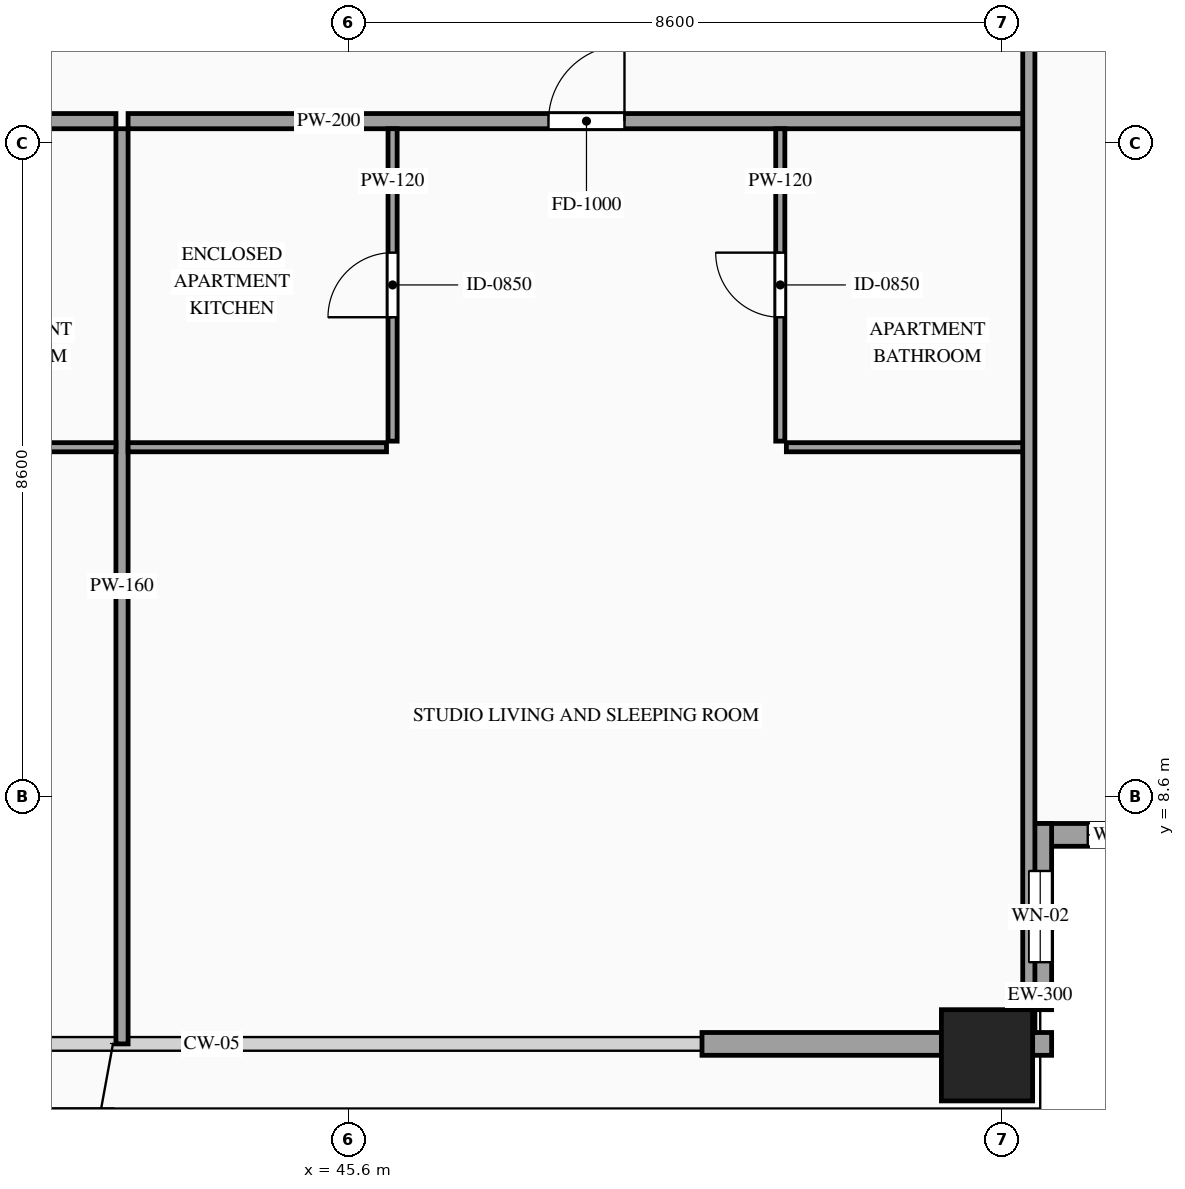
"""IFC4 building model, lengths in metres.
Left out: names, types, materials, properties, quantities, classifications, styles, units other than length and angle.
Written with IfcOpenShell. Run it as: python <this file> out.ifc"""

import sys

from ifc_helpers import new_model, si_unit, direction, frame, frame_2d, origin, origin_2d, place, context, subcontext, project, spatial, rectangle, hollow_rectangle, extrude, source, transform, mapped, element, fill, save


model = new_model("IFC4")
c1 = context("Model", 3, precision=1e-05, world=origin(), true_north=direction((0.0, 1.0)))
c2 = subcontext(c1, "Body", "Model", "MODEL_VIEW")
j1 = project(units=[si_unit("LENGTHUNIT", "METRE"), si_unit("PLANEANGLEUNIT", "RADIAN")], contexts=[c1])
p1 = place(None, origin())
s1 = spatial("IfcSite", under=j1, at=p1, CompositionType="ELEMENT")
p2 = place(p1, origin())
s2 = spatial("IfcBuilding", under=s1, at=p2, CompositionType="ELEMENT")
p3 = place(p2, frame((0.0, 0.0, 241.6)))
s3 = spatial("IfcBuildingStorey", under=s2, at=p3, CompositionType="ELEMENT", Elevation=241.6)
m1 = source(origin(), c2, "Body", "SweptSolid", [
    extrude(hollow_rectangle(XDim=1.2, YDim=1.2, WallThickness=0.055, at=origin_2d()), origin(), (0.0, 0.0, 1.0), 3.5),
])
p4 = place(p3, frame((54.0, 5.2, 0.0), z_axis=(0.0, 0.0, 1.0), x_axis=(1.0, 0.0, 0.0)))
e1 = element("IfcColumn", 1, at=p4, inside=s3, PredefinedType="COLUMN", context=c2, shape_type="MappedRepresentation", body=[
    mapped(m1, transform((0.0, 0.0, 0.0), scale=1.0)),
])
p5 = place(p3, frame((54.55, 8.1, 0.0), z_axis=(0.0, 0.0, 1.0), x_axis=(1.0, 0.0, 0.0)))
e2 = element("IfcWall", 2, at=p5, inside=s3, PredefinedType="SOLIDWALL", context=c2, shape_type="SweptSolid", body=[
    extrude(rectangle(XDim=2.45, YDim=0.3, at=frame_2d((1.225, 0.0))), origin(), (0.0, 0.0, 1.0), 3.28),
])
p6 = place(p5, frame((0.775, 0.0, 0.85)))
e3 = element("IfcOpeningElement", 3, at=p6, cuts=e2, PredefinedType="OPENING", context=c2, shape_type="SweptSolid", body=[
    extrude(rectangle(XDim=0.9, YDim=1.5, at=frame_2d((0.45, 0.75))), frame((0.0, 0.165, 0.0), z_axis=(0.0, -1.0, 0.0), x_axis=(1.0, 0.0, 0.0)), (0.0, 0.0, 1.0), 0.33),
])
p7 = place(p3, frame((54.7, 5.8, 0.0), z_axis=(0.0, 0.0, 1.0), x_axis=(0.0, 1.0, 0.0)))
e4 = element("IfcWall", 4, at=p7, inside=s3, PredefinedType="SOLIDWALL", context=c2, shape_type="SweptSolid", body=[
    extrude(rectangle(XDim=2.45, YDim=0.3, at=frame_2d((1.225, 0.0))), origin(), (0.0, 0.0, 1.0), 3.28),
])
p8 = place(p7, frame((0.625, 0.0, 0.85)))
e5 = element("IfcOpeningElement", 5, at=p8, cuts=e4, PredefinedType="OPENING", context=c2, shape_type="SweptSolid", body=[
    extrude(rectangle(XDim=1.2, YDim=2.1, at=frame_2d((0.6, 1.05))), frame((0.0, 0.165, 0.0), z_axis=(0.0, -1.0, 0.0), x_axis=(1.0, 0.0, 0.0)), (0.0, 0.0, 1.0), 0.33),
])
m2 = source(origin(), c2, "Body", "SweptSolid", [
    extrude(rectangle(XDim=0.25, YDim=0.3, at=frame_2d((0.125, 0.0))), origin(), (0.0, 0.0, 1.0), 3.28),
])
p9 = place(p3, frame((54.6, 5.35, 0.0), z_axis=(0.0, 0.0, 1.0), x_axis=(1.0, 0.0, 0.0)))
e6 = element("IfcWall", 6, at=p9, inside=s3, PredefinedType="SOLIDWALL", context=c2, shape_type="MappedRepresentation", body=[
    mapped(m2, transform((0.0, 0.0, 0.0), scale=1.0)),
])
m3 = source(origin(), c2, "Body", "SweptSolid", [
    extrude(rectangle(XDim=3.15, YDim=0.3, at=frame_2d((1.575, 0.0))), origin(), (0.0, 0.0, 1.0), 2.835),
])
p10 = place(p3, frame((50.25, 5.35, 0.0), z_axis=(0.0, 0.0, 1.0), x_axis=(1.0, 0.0, 0.0)))
e7 = element("IfcWall", 7, at=p10, inside=s3, PredefinedType="SOLIDWALL", context=c2, shape_type="MappedRepresentation", body=[
    mapped(m3, transform((0.0, 0.0, 0.0), scale=1.0)),
])
p11 = place(p3, frame((31.11, 17.49, 0.0), z_axis=(0.0, 0.0, 1.0), x_axis=(1.0, 0.0, 0.0)))
e8 = element("IfcWall", 8, at=p11, inside=s3, PredefinedType="PARTITIONING", context=c2, shape_type="SweptSolid", body=[
    extrude(rectangle(XDim=11.429, YDim=0.2, at=frame_2d((5.714, 0.0))), origin(), (0.0, 0.0, 1.0), 3.28),
])
p12 = place(p11, frame((5.314, 0.0, 0.0)))
e9 = element("IfcOpeningElement", 9, at=p12, cuts=e8, PredefinedType="OPENING", context=c2, shape_type="SweptSolid", body=[
    extrude(rectangle(XDim=1.0, YDim=2.2, at=frame_2d((0.5, 1.1))), frame((0.0, 0.115, 0.0), z_axis=(0.0, -1.0, 0.0), x_axis=(1.0, 0.0, 0.0)), (0.0, 0.0, 1.0), 0.23),
])
m4 = source(origin(), c2, "Body", "SweptSolid", [
    extrude(rectangle(XDim=12.04, YDim=0.16, at=frame_2d((6.02, 0.0))), origin(), (0.0, 0.0, 1.0), 3.28),
])
p13 = place(p3, frame((42.619, 5.35, 0.0), z_axis=(0.0, 0.0, 1.0), x_axis=(0.0, 1.0, 0.0)))
e10 = element("IfcWall", 10, at=p13, inside=s3, PredefinedType="PARTITIONING", context=c2, shape_type="MappedRepresentation", body=[
    mapped(m4, transform((0.0, 0.0, 0.0), scale=1.0)),
])
m5 = source(origin(), c2, "Body", "SweptSolid", [
    extrude(rectangle(XDim=3.2, YDim=0.12, at=frame_2d((1.6, 0.0))), origin(), (0.0, 0.0, 1.0), 3.28),
])
p14 = place(p3, frame((39.339, 13.2, 0.0), z_axis=(0.0, 0.0, 1.0), x_axis=(1.0, 0.0, 0.0)))
e11 = element("IfcWall", 11, at=p14, inside=s3, PredefinedType="PARTITIONING", context=c2, shape_type="MappedRepresentation", body=[
    mapped(m5, transform((0.0, 0.0, 0.0), scale=1.0)),
])
p15 = place(p3, frame((42.699, 17.49, 0.0), z_axis=(0.0, 0.0, 1.0), x_axis=(1.0, 0.0, 0.0)))
e12 = element("IfcWall", 12, at=p15, inside=s3, PredefinedType="PARTITIONING", context=c2, shape_type="SweptSolid", body=[
    extrude(rectangle(XDim=11.861, YDim=0.2, at=frame_2d((5.931, 0.0))), origin(), (0.0, 0.0, 1.0), 3.28),
])
p16 = place(p15, frame((5.531, 0.0, 0.0)))
e13 = element("IfcOpeningElement", 13, at=p16, cuts=e12, PredefinedType="OPENING", context=c2, shape_type="SweptSolid", body=[
    extrude(rectangle(XDim=1.0, YDim=2.2, at=frame_2d((0.5, 1.1))), frame((0.0, 0.115, 0.0), z_axis=(0.0, -1.0, 0.0), x_axis=(1.0, 0.0, 0.0)), (0.0, 0.0, 1.0), 0.23),
])
m6 = source(origin(), c2, "Body", "SweptSolid", [
    extrude(rectangle(XDim=3.4, YDim=0.12, at=frame_2d((1.7, 0.0))), origin(), (0.0, 0.0, 1.0), 3.28),
])
p17 = place(p3, frame((42.699, 13.2, 0.0), z_axis=(0.0, 0.0, 1.0), x_axis=(1.0, 0.0, 0.0)))
e14 = element("IfcWall", 14, at=p17, inside=s3, PredefinedType="PARTITIONING", context=c2, shape_type="MappedRepresentation", body=[
    mapped(m6, transform((0.0, 0.0, 0.0), scale=1.0)),
])
p18 = place(p3, frame((46.179, 13.28, 0.0), z_axis=(0.0, 0.0, 1.0), x_axis=(0.0, 1.0, 0.0)))
e15 = element("IfcWall", 15, at=p18, inside=s3, PredefinedType="PARTITIONING", context=c2, shape_type="SweptSolid", body=[
    extrude(rectangle(XDim=4.11, YDim=0.12, at=frame_2d((2.055, 0.0))), origin(), (0.0, 0.0, 1.0), 3.28),
])
p19 = place(p18, frame((1.63, 0.0, 0.0)))
e16 = element("IfcOpeningElement", 16, at=p19, cuts=e15, PredefinedType="OPENING", context=c2, shape_type="SweptSolid", body=[
    extrude(rectangle(XDim=0.85, YDim=2.1, at=frame_2d((0.425, 1.05))), frame((0.0, 0.075, 0.0), z_axis=(0.0, -1.0, 0.0), x_axis=(1.0, 0.0, 0.0)), (0.0, 0.0, 1.0), 0.15),
])
p20 = place(p3, frame((51.36, 13.2, 0.0), z_axis=(0.0, 0.0, 1.0), x_axis=(1.0, 0.0, 0.0)))
e17 = element("IfcWall", 17, at=p20, inside=s3, PredefinedType="PARTITIONING", context=c2, shape_type="MappedRepresentation", body=[
    mapped(m5, transform((0.0, 0.0, 0.0), scale=1.0)),
])
p21 = place(p3, frame((51.28, 13.28, 0.0), z_axis=(0.0, 0.0, 1.0), x_axis=(0.0, 1.0, 0.0)))
e18 = element("IfcWall", 18, at=p21, inside=s3, PredefinedType="PARTITIONING", context=c2, shape_type="SweptSolid", body=[
    extrude(rectangle(XDim=4.11, YDim=0.12, at=frame_2d((2.055, 0.0))), origin(), (0.0, 0.0, 1.0), 3.28),
])
p22 = place(p21, frame((1.63, 0.0, 0.0)))
e19 = element("IfcOpeningElement", 19, at=p22, cuts=e18, PredefinedType="OPENING", context=c2, shape_type="SweptSolid", body=[
    extrude(rectangle(XDim=0.85, YDim=2.1, at=frame_2d((0.425, 1.05))), frame((0.0, 0.075, 0.0), z_axis=(0.0, -1.0, 0.0), x_axis=(1.0, 0.0, 0.0)), (0.0, 0.0, 1.0), 0.15),
])
m7 = source(origin(), c2, "Body", "SweptSolid", [
    extrude(rectangle(XDim=26.69, YDim=0.16, at=frame_2d((13.345, 0.0))), origin(), (0.0, 0.0, 1.0), 3.28),
])
p23 = place(p3, frame((54.55, 5.5, 0.0), z_axis=(0.0, 0.0, 1.0), x_axis=(0.0, 1.0, 0.0)))
e20 = element("IfcWall", 20, at=p23, inside=s3, PredefinedType="PARTITIONING", context=c2, shape_type="MappedRepresentation", body=[
    mapped(m7, transform((0.0, 0.0, 0.0), scale=1.0)),
])
m8 = source(origin(), c2, "Body", "SweptSolid", [
    extrude(rectangle(XDim=0.9, YDim=1.5, at=frame_2d((0.45, 0.75))), frame((0.0, 0.03, 0.0), z_axis=(0.0, -1.0, 0.0), x_axis=(1.0, 0.0, 0.0)), (0.0, 0.0, 1.0), 0.06),
])
p24 = place(p6, origin())
e21 = element("IfcWindow", 21, at=p24, inside=s3, PartitioningType="SINGLE_PANEL", PredefinedType="WINDOW", context=c2, shape_type="MappedRepresentation", body=[
    mapped(m8, transform((0.0, 0.0, 0.0), scale=1.0)),
])
fill(e3, e21)
m9 = source(origin(), c2, "Body", "SweptSolid", [
    extrude(rectangle(XDim=1.2, YDim=2.1, at=frame_2d((0.6, 1.05))), frame((0.0, 0.03, 0.0), z_axis=(0.0, -1.0, 0.0), x_axis=(1.0, 0.0, 0.0)), (0.0, 0.0, 1.0), 0.06),
])
p25 = place(p8, origin())
e22 = element("IfcWindow", 22, at=p25, inside=s3, PartitioningType="SINGLE_PANEL", PredefinedType="WINDOW", context=c2, shape_type="MappedRepresentation", body=[
    mapped(m9, transform((0.0, 0.0, 0.0), scale=1.0)),
])
fill(e5, e22)
m10 = source(origin(), c2, "Body", "SweptSolid", [
    extrude(rectangle(XDim=1.0, YDim=2.2, at=frame_2d((0.5, 1.1))), frame((0.0, 0.025, 0.0), z_axis=(0.0, -1.0, 0.0), x_axis=(1.0, 0.0, 0.0)), (0.0, 0.0, 1.0), 0.05),
])
p26 = place(p16, origin())
e23 = element("IfcDoor", 23, at=p26, inside=s3, OperationType="SINGLE_SWING_RIGHT", PredefinedType="DOOR", context=c2, shape_type="MappedRepresentation", body=[
    mapped(m10, transform((0.0, 0.0, 0.0), scale=1.0)),
])
fill(e13, e23)
m11 = source(origin(), c2, "Body", "SweptSolid", [
    extrude(rectangle(XDim=0.85, YDim=2.1, at=frame_2d((0.425, 1.05))), frame((0.0, 0.025, 0.0), z_axis=(0.0, -1.0, 0.0), x_axis=(1.0, 0.0, 0.0)), (0.0, 0.0, 1.0), 0.05),
])
p27 = place(p19, origin())
e24 = element("IfcDoor", 24, at=p27, inside=s3, OperationType="SINGLE_SWING_LEFT", PredefinedType="DOOR", context=c2, shape_type="MappedRepresentation", body=[
    mapped(m11, transform((0.0, 0.0, 0.0), scale=1.0)),
])
fill(e16, e24)
p28 = place(p22, origin())
e25 = element("IfcDoor", 25, at=p28, inside=s3, OperationType="SINGLE_SWING_RIGHT", PredefinedType="DOOR", context=c2, shape_type="MappedRepresentation", body=[
    mapped(m11, transform((0.0, 0.0, 0.0), scale=1.0)),
])
fill(e19, e25)
save(model, sys.argv[1])
